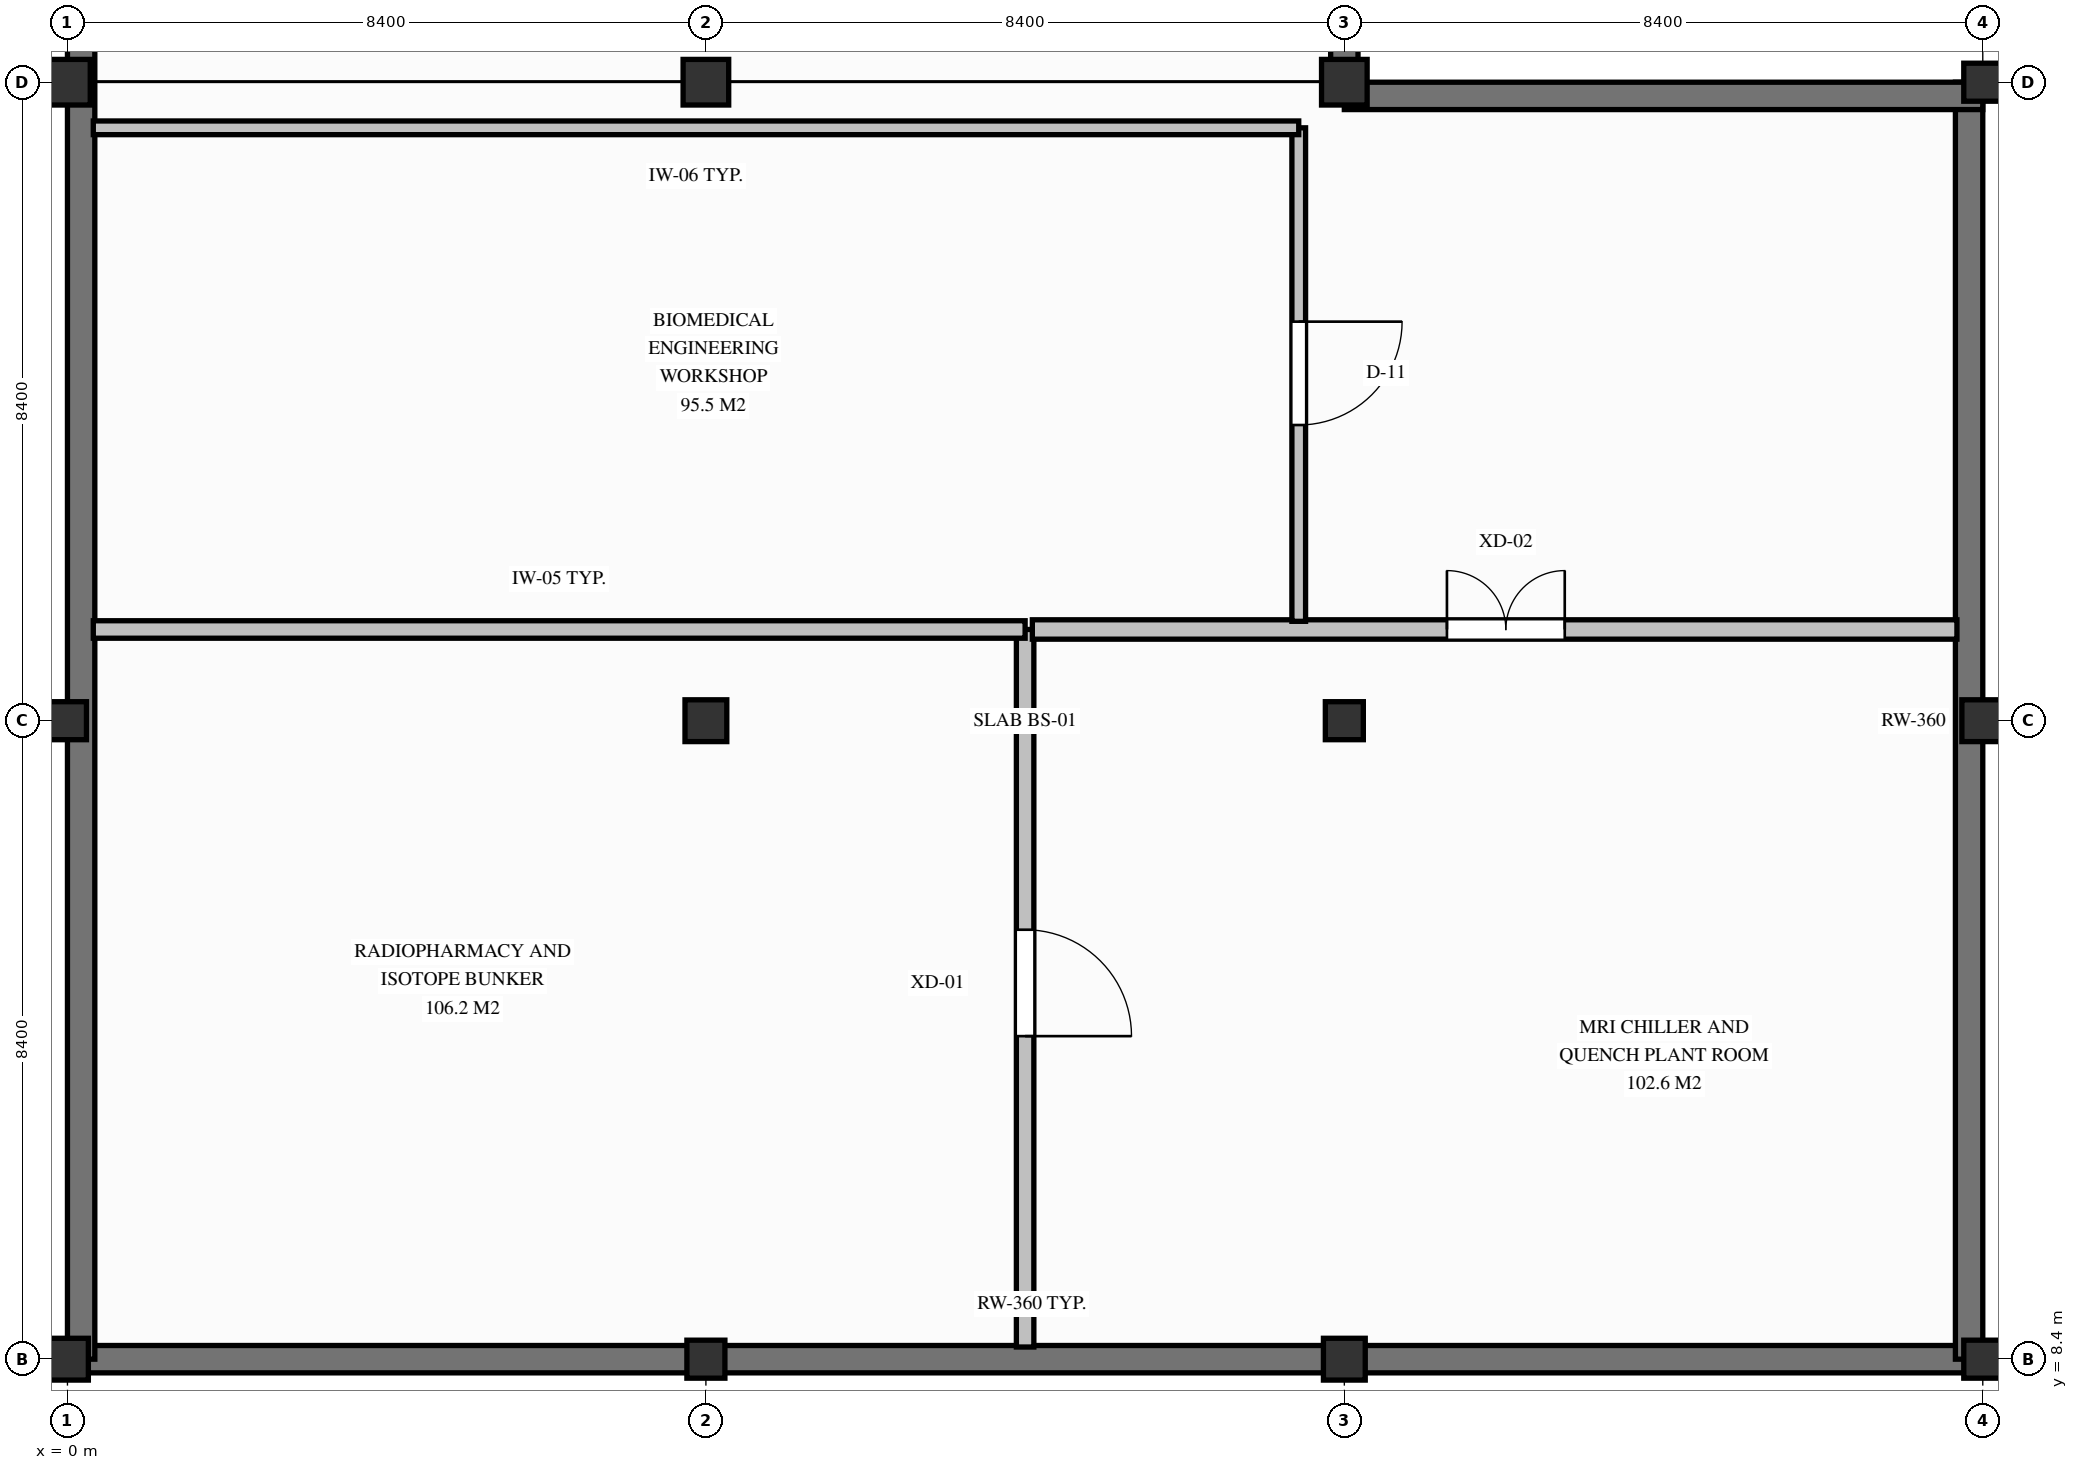
"""IFC4 building model, lengths in metres.
Left out: names, types, materials, properties, quantities, classifications, styles, units other than length and angle.
Written with IfcOpenShell. Run it as: python <this file> out.ifc"""

import sys

from ifc_helpers import new_model, si_unit, direction, frame, frame_2d, origin, origin_2d, place, context, subcontext, project, spatial, rectangle, extrude, element, fill, save


model = new_model("IFC4")
c1 = context("Model", 3, precision=1e-05, world=origin(), true_north=direction((0.0, 1.0)))
c2 = subcontext(c1, "Body", "Model", "MODEL_VIEW")
j1 = project(units=[si_unit("LENGTHUNIT", "METRE"), si_unit("PLANEANGLEUNIT", "RADIAN")], contexts=[c1])
p1 = place(None, origin())
s1 = spatial("IfcSite", under=j1, at=p1, CompositionType="ELEMENT")
p2 = place(p1, origin())
s2 = spatial("IfcBuilding", under=s1, at=p2, CompositionType="ELEMENT")
p3 = place(p2, frame((0.0, 0.0, -4.5)))
s3 = spatial("IfcBuildingStorey", under=s2, at=p3, CompositionType="ELEMENT", Elevation=-4.5)
p4 = place(p3, frame((0.18, 8.4, 0.0), z_axis=(0.0, 0.0, 1.0), x_axis=(1.0, 0.0, 0.0)))
e1 = element("IfcWall", 1, at=p4, inside=s3, PredefinedType="USERDEFINED", context=c2, shape_type="SweptSolid", body=[
    extrude(rectangle(XDim=25.02, YDim=0.36, at=frame_2d((12.51, 0.0))), origin(), (0.0, 0.0, 1.0), 4.5),
])
p5 = place(p3, frame((25.02, 8.4, 0.0), z_axis=(0.0, 0.0, 1.0), x_axis=(0.0, 1.0, 0.0)))
e2 = element("IfcWall", 2, at=p5, inside=s3, PredefinedType="USERDEFINED", context=c2, shape_type="SweptSolid", body=[
    extrude(rectangle(XDim=16.8, YDim=0.36, at=frame_2d((8.4, 0.0))), origin(), (0.0, 0.0, 1.0), 4.5),
])
p6 = place(p3, frame((16.8, 25.02, 0.0), z_axis=(0.0, 0.0, 1.0), x_axis=(1.0, 0.0, 0.0)))
e3 = element("IfcWall", 3, at=p6, inside=s3, PredefinedType="USERDEFINED", context=c2, shape_type="SweptSolid", body=[
    extrude(rectangle(XDim=8.4, YDim=0.36, at=frame_2d((4.2, 0.0))), origin(), (0.0, 0.0, 1.0), 4.5),
])
p7 = place(p3, frame((16.8, 25.2, 0.0), z_axis=(0.0, 0.0, 1.0), x_axis=(0.0, 1.0, 0.0)))
e4 = element("IfcWall", 4, at=p7, inside=s3, PredefinedType="USERDEFINED", context=c2, shape_type="SweptSolid", body=[
    extrude(rectangle(XDim=9.6, YDim=0.36, at=frame_2d((4.8, 0.0))), origin(), (0.0, 0.0, 1.0), 4.5),
])
p8 = place(p3, frame((0.18, 8.4, 0.0), z_axis=(0.0, 0.0, 1.0), x_axis=(0.0, 1.0, 0.0)))
e5 = element("IfcWall", 5, at=p8, inside=s3, PredefinedType="USERDEFINED", context=c2, shape_type="SweptSolid", body=[
    extrude(rectangle(XDim=26.4, YDim=0.36, at=frame_2d((13.2, 0.0))), origin(), (0.0, 0.0, 1.0), 4.5),
])
p9 = place(p3, frame((0.0, 8.4, 0.0), z_axis=(0.0, 0.0, 1.0), x_axis=(1.0, 0.0, 0.0)))
e6 = element("IfcColumn", 6, at=p9, inside=s3, PredefinedType="COLUMN", context=c2, shape_type="SweptSolid", body=[
    extrude(rectangle(XDim=0.55, YDim=0.55, at=origin_2d()), origin(), (0.0, 0.0, 1.0), 4.5),
])
p10 = place(p3, frame((0.0, 16.8, 0.0), z_axis=(0.0, 0.0, 1.0), x_axis=(1.0, 0.0, 0.0)))
e7 = element("IfcColumn", 7, at=p10, inside=s3, PredefinedType="COLUMN", context=c2, shape_type="SweptSolid", body=[
    extrude(rectangle(XDim=0.5, YDim=0.5, at=origin_2d()), origin(), (0.0, 0.0, 1.0), 4.5),
])
p11 = place(p3, frame((0.0, 25.2, 0.0), z_axis=(0.0, 0.0, 1.0), x_axis=(1.0, 0.0, 0.0)))
e8 = element("IfcColumn", 8, at=p11, inside=s3, PredefinedType="COLUMN", context=c2, shape_type="SweptSolid", body=[
    extrude(rectangle(XDim=0.6, YDim=0.6, at=origin_2d()), origin(), (0.0, 0.0, 1.0), 4.5),
])
p12 = place(p3, frame((8.4, 8.4, 0.0), z_axis=(0.0, 0.0, 1.0), x_axis=(1.0, 0.0, 0.0)))
e9 = element("IfcColumn", 9, at=p12, inside=s3, PredefinedType="COLUMN", context=c2, shape_type="SweptSolid", body=[
    extrude(rectangle(XDim=0.5, YDim=0.5, at=origin_2d()), origin(), (0.0, 0.0, 1.0), 4.5),
])
p13 = place(p3, frame((8.4, 16.8, 0.0), z_axis=(0.0, 0.0, 1.0), x_axis=(1.0, 0.0, 0.0)))
e10 = element("IfcColumn", 10, at=p13, inside=s3, PredefinedType="COLUMN", context=c2, shape_type="SweptSolid", body=[
    extrude(rectangle(XDim=0.55, YDim=0.55, at=origin_2d()), origin(), (0.0, 0.0, 1.0), 4.5),
])
p14 = place(p3, frame((8.4, 25.2, 0.0), z_axis=(0.0, 0.0, 1.0), x_axis=(1.0, 0.0, 0.0)))
e11 = element("IfcColumn", 11, at=p14, inside=s3, PredefinedType="COLUMN", context=c2, shape_type="SweptSolid", body=[
    extrude(rectangle(XDim=0.6, YDim=0.6, at=origin_2d()), origin(), (0.0, 0.0, 1.0), 4.5),
])
p15 = place(p3, frame((16.8, 8.4, 0.0), z_axis=(0.0, 0.0, 1.0), x_axis=(1.0, 0.0, 0.0)))
e12 = element("IfcColumn", 12, at=p15, inside=s3, PredefinedType="COLUMN", context=c2, shape_type="SweptSolid", body=[
    extrude(rectangle(XDim=0.55, YDim=0.55, at=origin_2d()), origin(), (0.0, 0.0, 1.0), 4.5),
])
p16 = place(p3, frame((16.8, 16.8, 0.0), z_axis=(0.0, 0.0, 1.0), x_axis=(1.0, 0.0, 0.0)))
e13 = element("IfcColumn", 13, at=p16, inside=s3, PredefinedType="COLUMN", context=c2, shape_type="SweptSolid", body=[
    extrude(rectangle(XDim=0.5, YDim=0.5, at=origin_2d()), origin(), (0.0, 0.0, 1.0), 4.5),
])
p17 = place(p3, frame((16.8, 25.2, 0.0), z_axis=(0.0, 0.0, 1.0), x_axis=(1.0, 0.0, 0.0)))
e14 = element("IfcColumn", 14, at=p17, inside=s3, PredefinedType="COLUMN", context=c2, shape_type="SweptSolid", body=[
    extrude(rectangle(XDim=0.6, YDim=0.6, at=origin_2d()), origin(), (0.0, 0.0, 1.0), 4.5),
])
p18 = place(p3, frame((25.2, 8.4, 0.0), z_axis=(0.0, 0.0, 1.0), x_axis=(1.0, 0.0, 0.0)))
e15 = element("IfcColumn", 15, at=p18, inside=s3, PredefinedType="COLUMN", context=c2, shape_type="SweptSolid", body=[
    extrude(rectangle(XDim=0.5, YDim=0.5, at=origin_2d()), origin(), (0.0, 0.0, 1.0), 4.5),
])
p19 = place(p3, frame((25.2, 16.8, 0.0), z_axis=(0.0, 0.0, 1.0), x_axis=(1.0, 0.0, 0.0)))
e16 = element("IfcColumn", 16, at=p19, inside=s3, PredefinedType="COLUMN", context=c2, shape_type="SweptSolid", body=[
    extrude(rectangle(XDim=0.55, YDim=0.55, at=origin_2d()), origin(), (0.0, 0.0, 1.0), 4.5),
])
p20 = place(p3, frame((25.2, 25.2, 0.0), z_axis=(0.0, 0.0, 1.0), x_axis=(1.0, 0.0, 0.0)))
e17 = element("IfcColumn", 17, at=p20, inside=s3, PredefinedType="COLUMN", context=c2, shape_type="SweptSolid", body=[
    extrude(rectangle(XDim=0.5, YDim=0.5, at=origin_2d()), origin(), (0.0, 0.0, 1.0), 4.5),
])
p21 = place(p3, frame((12.6, 18.0, 0.0), z_axis=(0.0, 0.0, 1.0), x_axis=(0.0, -1.0, 0.0)))
e18 = element("IfcWall", 18, at=p21, inside=s3, PredefinedType="PARTITIONING", context=c2, shape_type="SweptSolid", body=[
    extrude(rectangle(XDim=9.44, YDim=0.23, at=frame_2d((4.72, 0.0))), origin(), (0.0, 0.0, 1.0), 3.313),
])
p22 = place(p21, frame((3.95, 0.0, 0.0)))
e19 = element("IfcOpeningElement", 19, at=p22, cuts=e18, PredefinedType="OPENING", context=c2, shape_type="SweptSolid", body=[
    extrude(rectangle(XDim=1.4, YDim=2.2, at=frame_2d((0.7, 1.1))), frame((0.0, 0.125, 0.0), z_axis=(0.0, -1.0, 0.0), x_axis=(1.0, 0.0, 0.0)), (0.0, 0.0, 1.0), 0.25),
])
p23 = place(p3, frame((0.34, 18.0, 0.0), z_axis=(0.0, 0.0, 1.0), x_axis=(1.0, 0.0, 0.0)))
e20 = element("IfcWall", 20, at=p23, inside=s3, PredefinedType="PARTITIONING", context=c2, shape_type="SweptSolid", body=[
    extrude(rectangle(XDim=12.26, YDim=0.23, at=frame_2d((6.13, 0.0))), origin(), (0.0, 0.0, 1.0), 3.413),
])
p24 = place(p3, frame((12.695, 18.0, 0.0), z_axis=(0.0, 0.0, 1.0), x_axis=(1.0, 0.0, 0.0)))
e21 = element("IfcWall", 21, at=p24, inside=s3, PredefinedType="PARTITIONING", context=c2, shape_type="SweptSolid", body=[
    extrude(rectangle(XDim=12.165, YDim=0.255, at=frame_2d((6.083, 0.0))), origin(), (0.0, 0.0, 1.0), 3.513),
])
p25 = place(p24, frame((5.455, 0.0, 0.0)))
e22 = element("IfcOpeningElement", 22, at=p25, cuts=e21, PredefinedType="OPENING", context=c2, shape_type="SweptSolid", body=[
    extrude(rectangle(XDim=1.55, YDim=2.22, at=frame_2d((0.775, 1.11))), frame((0.0, 0.137, 0.0), z_axis=(0.0, -1.0, 0.0), x_axis=(1.0, 0.0, 0.0)), (0.0, 0.0, 1.0), 0.275),
])
p26 = place(p3, frame((16.2, 24.6, 0.0), z_axis=(0.0, 0.0, 1.0), x_axis=(0.0, -1.0, 0.0)))
e23 = element("IfcWall", 23, at=p26, inside=s3, PredefinedType="PARTITIONING", context=c2, shape_type="SweptSolid", body=[
    extrude(rectangle(XDim=6.493, YDim=0.18, at=frame_2d((3.246, 0.0))), origin(), (0.0, 0.0, 1.0), 4.23),
])
p27 = place(p26, frame((2.55, 0.0, 0.0)))
e24 = element("IfcOpeningElement", 24, at=p27, cuts=e23, PredefinedType="OPENING", context=c2, shape_type="SweptSolid", body=[
    extrude(rectangle(XDim=1.36, YDim=2.2, at=frame_2d((0.68, 1.1))), frame((0.0, 0.1, 0.0), z_axis=(0.0, -1.0, 0.0), x_axis=(1.0, 0.0, 0.0)), (0.0, 0.0, 1.0), 0.2),
])
p28 = place(p3, frame((0.34, 24.6, 0.0), z_axis=(0.0, 0.0, 1.0), x_axis=(1.0, 0.0, 0.0)))
e25 = element("IfcWall", 25, at=p28, inside=s3, PredefinedType="PARTITIONING", context=c2, shape_type="SweptSolid", body=[
    extrude(rectangle(XDim=15.86, YDim=0.18, at=frame_2d((7.93, 0.0))), origin(), (0.0, 0.0, 1.0), 3.413),
])
p29 = place(p22, origin())
e26 = element("IfcDoor", 26, at=p29, inside=s3, OperationType="SINGLE_SWING_RIGHT", PredefinedType="DOOR", context=c2, shape_type="SweptSolid", body=[
    extrude(rectangle(XDim=1.4, YDim=2.2, at=frame_2d((0.7, 1.1))), frame((0.0, 0.025, 0.0), z_axis=(0.0, -1.0, 0.0), x_axis=(1.0, 0.0, 0.0)), (0.0, 0.0, 1.0), 0.05),
])
fill(e19, e26)
p30 = place(p25, origin())
e27 = element("IfcDoor", 27, at=p30, inside=s3, OperationType="DOUBLE_DOOR_SINGLE_SWING", PredefinedType="DOOR", context=c2, shape_type="SweptSolid", body=[
    extrude(rectangle(XDim=1.55, YDim=2.22, at=frame_2d((0.775, 1.11))), frame((0.0, 0.025, 0.0), z_axis=(0.0, -1.0, 0.0), x_axis=(1.0, 0.0, 0.0)), (0.0, 0.0, 1.0), 0.05),
])
fill(e22, e27)
p31 = place(p27, origin())
e28 = element("IfcDoor", 28, at=p31, inside=s3, OperationType="SINGLE_SWING_LEFT", PredefinedType="DOOR", context=c2, shape_type="SweptSolid", body=[
    extrude(rectangle(XDim=1.36, YDim=2.2, at=frame_2d((0.68, 1.1))), frame((0.0, 0.025, 0.0), z_axis=(0.0, -1.0, 0.0), x_axis=(1.0, 0.0, 0.0)), (0.0, 0.0, 1.0), 0.05),
])
fill(e24, e28)
save(model, sys.argv[1])
